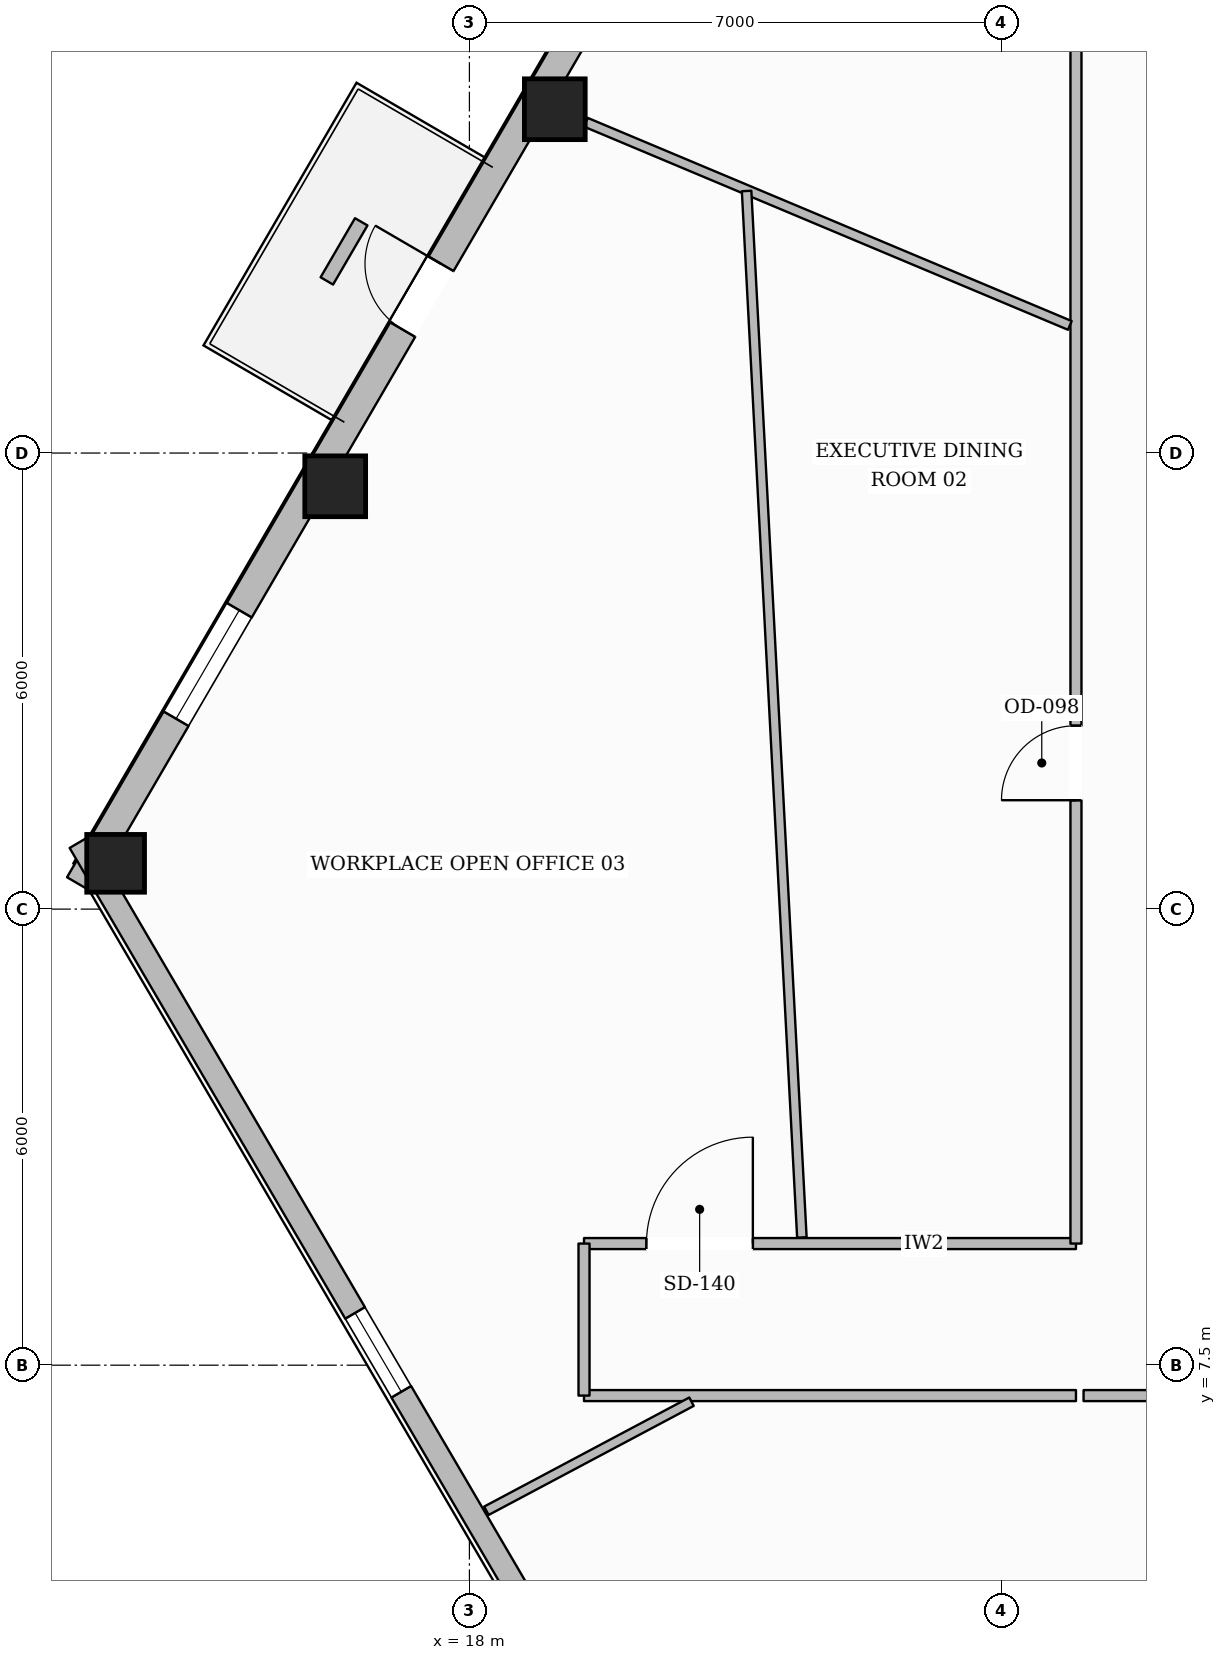
"""IFC4 building model, lengths in metres.
Left out: names, types, materials, properties, quantities, classifications, styles, units other than length and angle.
Written with IfcOpenShell. Run it as: python <this file> out.ifc"""

import sys

from ifc_helpers import new_model, si_unit, direction, frame, frame_2d, origin, origin_2d, place, context, subcontext, project, spatial, rectangle, hollow_rectangle, extrude, element, fill, save


model = new_model("IFC4")
c1 = context("Model", 3, precision=1e-05, world=origin(), true_north=direction((0.0, 1.0)))
c2 = subcontext(c1, "Body", "Model", "MODEL_VIEW")
j1 = project(units=[si_unit("LENGTHUNIT", "METRE"), si_unit("PLANEANGLEUNIT", "RADIAN")], contexts=[c1])
p1 = place(None, origin())
s1 = spatial("IfcSite", under=j1, at=p1, CompositionType="ELEMENT")
p2 = place(p1, origin())
s2 = spatial("IfcBuilding", under=s1, at=p2, CompositionType="ELEMENT")
p3 = place(p2, frame((0.0, 0.0, 56.05)))
s3 = spatial("IfcBuildingStorey", under=s2, at=p3, CompositionType="ELEMENT", Elevation=56.05)
for number, where, z_axis, x_axis in (
    (1, (19.123, 24.023, 0.0), (0.0, 0.0, 1.0), (1.0, 0.0, 0.0)),
    (2, (16.235, 19.063, 0.0), (0.0, 0.0, 1.0), (1.0, 0.0, 0.0)),
):
    element("IfcColumn", number, at=place(p3, frame(where, z_axis=z_axis, x_axis=x_axis)), inside=s3, PredefinedType="COLUMN", context=c2, shape_type="SweptSolid", body=[
        extrude(hollow_rectangle(XDim=0.8, YDim=0.8, WallThickness=0.036, at=origin_2d()), origin(), (0.0, 0.0, 1.0), 3.59),
    ])
p4 = place(p3, frame((13.345, 14.102, 0.0), z_axis=(0.0, 0.0, 1.0), x_axis=(1.0, 0.0, 0.0)))
e3 = element("IfcColumn", 3, at=p4, inside=s3, PredefinedType="COLUMN", context=c2, shape_type="SweptSolid", body=[
    extrude(hollow_rectangle(XDim=0.76, YDim=0.76, WallThickness=0.035, at=origin_2d()), origin(), (0.0, 0.0, 1.0), 3.59),
])
p5 = place(p3, frame((12.87, 13.823, 0.0), z_axis=(0.0, 0.0, 1.0), x_axis=(0.503276134116, 0.864125646437, 0.0)))
e4 = element("IfcWall", 4, at=p5, inside=s3, PredefinedType="STANDARD", context=c2, shape_type="SweptSolid", body=[
    extrude(rectangle(XDim=35.399, YDim=0.38, at=frame_2d((17.699, 0.0))), origin(), (0.0, 0.0, 1.0), 2.97),
])
p6 = place(p5, frame((8.45, 0.0, 0.0)))
e5 = element("IfcOpeningElement", 5, at=p6, cuts=e4, PredefinedType="OPENING", context=c2, shape_type="SweptSolid", body=[
    extrude(rectangle(XDim=1.0, YDim=2.2, at=frame_2d((0.5, 1.1))), frame((0.0, 0.2, 0.0), z_axis=(0.0, -1.0, 0.0), x_axis=(1.0, 0.0, 0.0)), (0.0, 0.0, 1.0), 0.4),
])
p7 = place(p5, frame((31.227, 0.0, 0.65)))
e6 = element("IfcOpeningElement", 6, at=p7, cuts=e4, PredefinedType="OPENING", context=c2, shape_type="SweptSolid", body=[
    extrude(rectangle(XDim=1.65, YDim=1.75, at=frame_2d((0.825, 0.875))), frame((0.0, 0.2, 0.0), z_axis=(0.0, -1.0, 0.0), x_axis=(1.0, 0.0, 0.0)), (0.0, 0.0, 1.0), 0.4),
])
p8 = place(p5, frame((25.487, 0.0, 0.65)))
e7 = element("IfcOpeningElement", 7, at=p8, cuts=e4, PredefinedType="OPENING", context=c2, shape_type="SweptSolid", body=[
    extrude(rectangle(XDim=1.65, YDim=1.75, at=frame_2d((0.825, 0.875))), frame((0.0, 0.2, 0.0), z_axis=(0.0, -1.0, 0.0), x_axis=(1.0, 0.0, 0.0)), (0.0, 0.0, 1.0), 0.4),
])
p9 = place(p5, frame((19.747, 0.0, 0.65)))
e8 = element("IfcOpeningElement", 8, at=p9, cuts=e4, PredefinedType="OPENING", context=c2, shape_type="SweptSolid", body=[
    extrude(rectangle(XDim=1.65, YDim=1.75, at=frame_2d((0.825, 0.875))), frame((0.0, 0.2, 0.0), z_axis=(0.0, -1.0, 0.0), x_axis=(1.0, 0.0, 0.0)), (0.0, 0.0, 1.0), 0.4),
])
p10 = place(p5, frame((2.525, 0.0, 0.65)))
e9 = element("IfcOpeningElement", 9, at=p10, cuts=e4, PredefinedType="OPENING", context=c2, shape_type="SweptSolid", body=[
    extrude(rectangle(XDim=1.65, YDim=1.75, at=frame_2d((0.825, 0.875))), frame((0.0, 0.2, 0.0), z_axis=(0.0, -1.0, 0.0), x_axis=(1.0, 0.0, 0.0)), (0.0, 0.0, 1.0), 0.4),
])
p11 = place(p3, frame((20.73, 0.957, 0.0), z_axis=(0.0, 0.0, 1.0), x_axis=(-0.5053057827, 0.86294036061, 0.0)))
e10 = element("IfcWall", 10, at=p11, inside=s3, PredefinedType="STANDARD", context=c2, shape_type="SweptSolid", body=[
    extrude(rectangle(XDim=15.556, YDim=0.3, at=frame_2d((7.778, 0.0))), origin(), (0.0, 0.0, 1.0), 2.97),
])
p12 = place(p11, frame((7.178, 0.0, 0.65)))
e11 = element("IfcOpeningElement", 11, at=p12, cuts=e10, PredefinedType="OPENING", context=c2, shape_type="SweptSolid", body=[
    extrude(rectangle(XDim=1.2, YDim=1.7, at=frame_2d((0.6, 0.85))), frame((0.0, 0.16, 0.0), z_axis=(0.0, -1.0, 0.0), x_axis=(1.0, 0.0, 0.0)), (0.0, 0.0, 1.0), 0.32),
])
p13 = place(p3, frame((16.577, 22.542, 0.0), z_axis=(0.0, 0.0, 1.0), x_axis=(-0.503280491755, -0.864123108485, 0.0)))
e12 = element("IfcWall", 12, at=p13, inside=s3, PredefinedType="USERDEFINED", context=c2, shape_type="SweptSolid", body=[
    extrude(rectangle(XDim=0.9, YDim=0.19, at=frame_2d((0.45, 0.0))), origin(), (0.0, 0.0, 1.0), 0.5),
])
p14 = place(p3, frame((19.508, 9.1, 0.0), z_axis=(0.0, 0.0, 1.0), x_axis=(1.0, 0.0, 0.0)))
e13 = element("IfcWall", 13, at=p14, inside=s3, PredefinedType="PARTITIONING", context=c2, shape_type="SweptSolid", body=[
    extrude(rectangle(XDim=6.472, YDim=0.145, at=frame_2d((3.236, 0.0))), origin(), (0.0, 0.0, 1.0), 3.59),
])
p15 = place(p14, frame((0.821, 0.0, 0.0)))
e14 = element("IfcOpeningElement", 14, at=p15, cuts=e13, PredefinedType="OPENING", context=c2, shape_type="SweptSolid", body=[
    extrude(rectangle(XDim=1.4, YDim=2.2, at=frame_2d((0.7, 1.1))), frame((0.0, 0.083, 0.0), z_axis=(0.0, -1.0, 0.0), x_axis=(1.0, 0.0, 0.0)), (0.0, 0.0, 1.0), 0.165),
])
p16 = place(p3, frame((25.98, 9.1, 0.0), z_axis=(0.0, 0.0, 1.0), x_axis=(0.0, 1.0, 0.0)))
e15 = element("IfcWall", 15, at=p16, inside=s3, PredefinedType="PARTITIONING", context=c2, shape_type="SweptSolid", body=[
    extrude(rectangle(XDim=16.0, YDim=0.145, at=frame_2d((8.0, 0.0))), origin(), (0.0, 0.0, 1.0), 3.278),
])
p17 = place(p16, frame((5.833, 0.0, 0.0)))
e16 = element("IfcOpeningElement", 16, at=p17, cuts=e15, PredefinedType="OPENING", context=c2, shape_type="SweptSolid", body=[
    extrude(rectangle(XDim=0.98, YDim=2.15, at=frame_2d((0.49, 1.075))), frame((0.0, 0.083, 0.0), z_axis=(0.0, -1.0, 0.0), x_axis=(1.0, 0.0, 0.0)), (0.0, 0.0, 1.0), 0.165),
])
p18 = place(p3, frame((49.92, 7.1, 0.0), z_axis=(0.0, 0.0, 1.0), x_axis=(-1.0, 0.0, 0.0)))
e17 = element("IfcWall", 17, at=p18, inside=s3, PredefinedType="PARTITIONING", context=c2, shape_type="SweptSolid", body=[
    extrude(rectangle(XDim=23.84, YDim=0.145, at=frame_2d((11.92, 0.0))), origin(), (0.0, 0.0, 1.0), 3.278),
])
p19 = place(p18, frame((11.91, 0.0, 0.0)))
e18 = element("IfcOpeningElement", 18, at=p19, cuts=e17, PredefinedType="OPENING", context=c2, shape_type="SweptSolid", body=[
    extrude(rectangle(XDim=1.02, YDim=2.15, at=frame_2d((0.51, 1.075))), frame((0.0, 0.083, 0.0), z_axis=(0.0, -1.0, 0.0), x_axis=(1.0, 0.0, 0.0)), (0.0, 0.0, 1.0), 0.165),
])
p20 = place(p3, frame((25.98, 7.1, 0.0), z_axis=(0.0, 0.0, 1.0), x_axis=(-1.0, 0.0, 0.0)))
e19 = element("IfcWall", 19, at=p20, inside=s3, PredefinedType="PARTITIONING", context=c2, shape_type="SweptSolid", body=[
    extrude(rectangle(XDim=6.472, YDim=0.145, at=frame_2d((3.236, 0.0))), origin(), (0.0, 0.0, 1.0), 3.59),
])
p21 = place(p3, frame((19.508, 7.1, 0.0), z_axis=(0.0, 0.0, 1.0), x_axis=(0.0, 1.0, 0.0)))
e20 = element("IfcWall", 20, at=p21, inside=s3, PredefinedType="PARTITIONING", context=c2, shape_type="SweptSolid", body=[
    extrude(rectangle(XDim=2.0, YDim=0.145, at=frame_2d((1.0, 0.0))), origin(), (0.0, 0.0, 1.0), 3.59),
])
p22 = place(p3, frame((25.899, 21.179, 0.0), z_axis=(0.0, 0.0, 1.0), x_axis=(-0.922068663863, 0.387026328719, 0.0)))
e21 = element("IfcWall", 21, at=p22, inside=s3, PredefinedType="PARTITIONING", context=c2, shape_type="SweptSolid", body=[
    extrude(rectangle(XDim=6.906, YDim=0.125, at=frame_2d((3.453, 0.0))), origin(), (0.0, 0.0, 1.0), 3.057),
])
p23 = place(p3, frame((20.922, 7.02, 0.0), z_axis=(0.0, 0.0, 1.0), x_axis=(-0.882949174281, -0.469468588551, 0.0)))
e22 = element("IfcWall", 22, at=p23, inside=s3, PredefinedType="PARTITIONING", context=c2, shape_type="SweptSolid", body=[
    extrude(rectangle(XDim=3.057, YDim=0.125, at=frame_2d((1.528, 0.0))), origin(), (0.0, 0.0, 1.0), 3.59),
])
p24 = place(p3, frame((21.647, 22.948, 0.0), z_axis=(0.0, 0.0, 1.0), x_axis=(0.052754018436, -0.998607537293, 0.0)))
e23 = element("IfcWall", 23, at=p24, inside=s3, PredefinedType="PARTITIONING", context=c2, shape_type="SweptSolid", body=[
    extrude(rectangle(XDim=13.787, YDim=0.125, at=frame_2d((6.893, 0.0))), origin(), (0.0, 0.0, 1.0), 3.278),
])
p25 = place(p6, origin())
e24 = element("IfcDoor", 24, at=p25, inside=s3, OperationType="SINGLE_SWING_RIGHT", PredefinedType="DOOR", context=c2, shape_type="SweptSolid", body=[
    extrude(rectangle(XDim=1.0, YDim=2.2, at=frame_2d((0.5, 1.1))), frame((0.0, 0.025, 0.0), z_axis=(0.0, -1.0, 0.0), x_axis=(1.0, 0.0, 0.0)), (0.0, 0.0, 1.0), 0.05),
])
fill(e5, e24)
p26 = place(p10, origin())
e25 = element("IfcWindow", 25, at=p26, inside=s3, PartitioningType="SINGLE_PANEL", PredefinedType="WINDOW", context=c2, shape_type="SweptSolid", body=[
    extrude(rectangle(XDim=1.65, YDim=1.75, at=frame_2d((0.825, 0.875))), frame((0.0, 0.03, 0.0), z_axis=(0.0, -1.0, 0.0), x_axis=(1.0, 0.0, 0.0)), (0.0, 0.0, 1.0), 0.06),
])
fill(e9, e25)
p27 = place(p12, origin())
e26 = element("IfcWindow", 26, at=p27, inside=s3, PartitioningType="SINGLE_PANEL", PredefinedType="WINDOW", context=c2, shape_type="SweptSolid", body=[
    extrude(rectangle(XDim=1.2, YDim=1.7, at=frame_2d((0.6, 0.85))), frame((0.0, 0.03, 0.0), z_axis=(0.0, -1.0, 0.0), x_axis=(1.0, 0.0, 0.0)), (0.0, 0.0, 1.0), 0.06),
])
fill(e11, e26)
p28 = place(p17, origin())
e27 = element("IfcDoor", 27, at=p28, inside=s3, OperationType="SINGLE_SWING_LEFT", PredefinedType="DOOR", context=c2, shape_type="SweptSolid", body=[
    extrude(rectangle(XDim=0.98, YDim=2.15, at=frame_2d((0.49, 1.075))), frame((0.0, 0.025, 0.0), z_axis=(0.0, -1.0, 0.0), x_axis=(1.0, 0.0, 0.0)), (0.0, 0.0, 1.0), 0.05),
])
fill(e16, e27)
p29 = place(p15, origin())
e28 = element("IfcDoor", 28, at=p29, inside=s3, OperationType="SINGLE_SWING_RIGHT", PredefinedType="DOOR", context=c2, shape_type="SweptSolid", body=[
    extrude(rectangle(XDim=1.4, YDim=2.2, at=frame_2d((0.7, 1.1))), frame((0.0, 0.025, 0.0), z_axis=(0.0, -1.0, 0.0), x_axis=(1.0, 0.0, 0.0)), (0.0, 0.0, 1.0), 0.05),
])
fill(e14, e28)
save(model, sys.argv[1])
